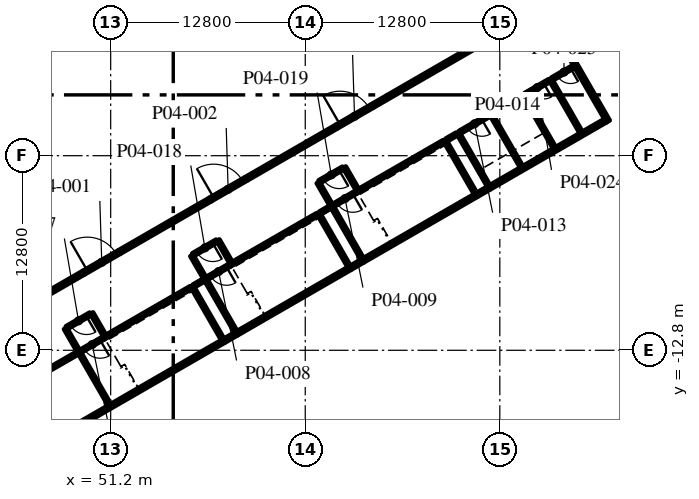
"""IFC4 building model, lengths in metres.
Left out: names, types, materials, properties, quantities, classifications, styles, units other than length and angle.
Written with IfcOpenShell. Run it as: python <this file> out.ifc"""

import sys

from ifc_helpers import new_model, si_unit, direction, frame, frame_2d, origin, place, context, subcontext, project, spatial, rectangle, extrude, element, fill, save


model = new_model("IFC4")
c1 = context("Model", 3, precision=1e-05, world=origin(), true_north=direction((0.0, 1.0)))
c2 = subcontext(c1, "Body", "Model", "MODEL_VIEW")
j1 = project(units=[si_unit("LENGTHUNIT", "METRE"), si_unit("PLANEANGLEUNIT", "RADIAN")], contexts=[c1])
p1 = place(None, origin())
s1 = spatial("IfcSite", under=j1, at=p1, CompositionType="ELEMENT")
p2 = place(p1, origin())
s2 = spatial("IfcBuilding", under=s1, at=p2, CompositionType="ELEMENT")
p3 = place(p2, frame((0.0, 0.0, 21.6)))
s3 = spatial("IfcBuildingStorey", under=s2, at=p3, CompositionType="ELEMENT", Elevation=21.6)
p4 = place(p3, frame((79.603, 9.73, 0.0), z_axis=(0.0, 0.0, 1.0), x_axis=(0.499999331568, -0.866025789703, 0.0)))
e1 = element("IfcWall", 1, at=p4, inside=s3, PredefinedType="SOLIDWALL", context=c2, shape_type="SweptSolid", body=[
    extrude(rectangle(XDim=8.625, YDim=0.25, at=frame_2d((4.312, 0.0))), origin(), (0.0, 0.0, 1.0), 4.5),
])
p5 = place(p3, frame((58.63, -12.194, 0.0), z_axis=(0.0, 0.0, 1.0), x_axis=(-0.866027159341, -0.499996959274, 0.0)))
e2 = element("IfcWall", 2, at=p5, inside=s3, PredefinedType="SOLIDWALL", context=c2, shape_type="SweptSolid", body=[
    extrude(rectangle(XDim=11.625, YDim=0.25, at=frame_2d((5.812, 0.0))), origin(), (0.0, 0.0, 1.0), 4.5),
])
p6 = place(p3, frame((66.944, -7.394, 0.0), z_axis=(0.0, 0.0, 1.0), x_axis=(-0.866033360935, -0.499986217557, 0.0)))
e3 = element("IfcWall", 3, at=p6, inside=s3, PredefinedType="SOLIDWALL", context=c2, shape_type="SweptSolid", body=[
    extrude(rectangle(XDim=8.6, YDim=0.25, at=frame_2d((4.3, 0.0))), origin(), (0.0, 0.0, 1.0), 4.5),
])
p7 = place(p3, frame((75.258, -2.594, 0.0), z_axis=(0.0, 0.0, 1.0), x_axis=(-0.866028165386, -0.499995216735, 0.0)))
e4 = element("IfcWall", 4, at=p7, inside=s3, PredefinedType="SOLIDWALL", context=c2, shape_type="SweptSolid", body=[
    extrude(rectangle(XDim=8.6, YDim=0.25, at=frame_2d((4.3, 0.0))), origin(), (0.0, 0.0, 1.0), 4.5),
])
p8 = place(p3, frame((83.744, 2.306, 0.0), z_axis=(0.0, 0.0, 1.0), x_axis=(-0.866013253925, -0.500021043584, 0.0)))
e5 = element("IfcWall", 5, at=p8, inside=s3, PredefinedType="SOLIDWALL", context=c2, shape_type="SweptSolid", body=[
    extrude(rectangle(XDim=8.8, YDim=0.25, at=frame_2d((4.4, 0.0))), origin(), (0.0, 0.0, 1.0), 4.5),
])
p9 = place(p3, frame((49.443, -7.683, 0.0), z_axis=(0.0, 0.0, 1.0), x_axis=(-0.866025499775, -0.499999833739, 0.0)))
e6 = element("IfcWall", 6, at=p9, inside=s3, PredefinedType="SOLIDWALL", context=c2, shape_type="SweptSolid", body=[
    extrude(rectangle(XDim=12.8, YDim=0.25, at=frame_2d((6.4, 0.0))), origin(), (0.0, 0.0, 1.0), 4.5),
])
p10 = place(p3, frame((49.443, -7.683, 0.0), z_axis=(0.0, 0.0, 1.0), x_axis=(0.866019956843, 0.50000943426, 0.0)))
e7 = element("IfcWall", 7, at=p10, inside=s3, PredefinedType="SOLIDWALL", context=c2, shape_type="SweptSolid", body=[
    extrude(rectangle(XDim=2.7, YDim=0.25, at=frame_2d((1.35, 0.0))), origin(), (0.0, 0.0, 1.0), 4.5),
])
p11 = place(p10, frame((0.25, 0.0, 0.0)))
e8 = element("IfcOpeningElement", 8, at=p11, cuts=e7, PredefinedType="OPENING", context=c2, shape_type="SweptSolid", body=[
    extrude(rectangle(XDim=2.2, YDim=2.1, at=frame_2d((1.1, 1.05))), frame((0.0, 0.135, 0.0), z_axis=(0.0, -1.0, 0.0), x_axis=(1.0, 0.0, 0.0)), (0.0, 0.0, 1.0), 0.27),
])
p12 = place(p3, frame((57.757, -2.883, 0.0), z_axis=(0.0, 0.0, 1.0), x_axis=(-0.866028853923, -0.499994024137, 0.0)))
e9 = element("IfcWall", 9, at=p12, inside=s3, PredefinedType="SOLIDWALL", context=c2, shape_type="SweptSolid", body=[
    extrude(rectangle(XDim=6.9, YDim=0.25, at=frame_2d((3.45, 0.0))), origin(), (0.0, 0.0, 1.0), 4.5),
])
p13 = place(p3, frame((57.757, -2.883, 0.0), z_axis=(0.0, 0.0, 1.0), x_axis=(0.86599734893, 0.500048589285, 0.0)))
e10 = element("IfcWall", 10, at=p13, inside=s3, PredefinedType="SOLIDWALL", context=c2, shape_type="SweptSolid", body=[
    extrude(rectangle(XDim=2.7, YDim=0.25, at=frame_2d((1.35, 0.0))), origin(), (0.0, 0.0, 1.0), 4.5),
])
p14 = place(p13, frame((0.25, 0.0, 0.0)))
e11 = element("IfcOpeningElement", 11, at=p14, cuts=e10, PredefinedType="OPENING", context=c2, shape_type="SweptSolid", body=[
    extrude(rectangle(XDim=2.2, YDim=2.1, at=frame_2d((1.1, 1.05))), frame((0.0, 0.135, 0.0), z_axis=(0.0, -1.0, 0.0), x_axis=(1.0, 0.0, 0.0)), (0.0, 0.0, 1.0), 0.27),
])
p15 = place(p3, frame((66.071, 1.917, 0.0), z_axis=(0.0, 0.0, 1.0), x_axis=(-0.866028853923, -0.499994024137, 0.0)))
e12 = element("IfcWall", 12, at=p15, inside=s3, PredefinedType="SOLIDWALL", context=c2, shape_type="SweptSolid", body=[
    extrude(rectangle(XDim=6.9, YDim=0.25, at=frame_2d((3.45, 0.0))), origin(), (0.0, 0.0, 1.0), 4.5),
])
p16 = place(p3, frame((66.071, 1.917, 0.0), z_axis=(0.0, 0.0, 1.0), x_axis=(0.866019956843, 0.50000943426, 0.0)))
e13 = element("IfcWall", 13, at=p16, inside=s3, PredefinedType="SOLIDWALL", context=c2, shape_type="SweptSolid", body=[
    extrude(rectangle(XDim=2.7, YDim=0.25, at=frame_2d((1.35, 0.0))), origin(), (0.0, 0.0, 1.0), 4.5),
])
p17 = place(p16, frame((0.25, 0.0, 0.0)))
e14 = element("IfcOpeningElement", 14, at=p17, cuts=e13, PredefinedType="OPENING", context=c2, shape_type="SweptSolid", body=[
    extrude(rectangle(XDim=2.2, YDim=2.1, at=frame_2d((1.1, 1.05))), frame((0.0, 0.135, 0.0), z_axis=(0.0, -1.0, 0.0), x_axis=(1.0, 0.0, 0.0)), (0.0, 0.0, 1.0), 0.27),
])
p18 = place(p3, frame((79.494, 9.667, 0.0), z_axis=(0.0, 0.0, 1.0), x_axis=(-0.866025499775, -0.499999833739, 0.0)))
e15 = element("IfcWall", 15, at=p18, inside=s3, PredefinedType="SOLIDWALL", context=c2, shape_type="SweptSolid", body=[
    extrude(rectangle(XDim=12.8, YDim=0.25, at=frame_2d((6.4, 0.0))), origin(), (0.0, 0.0, 1.0), 4.5),
])
for number, where, z_axis, x_axis in (
    (16, (59.496, -11.694, 0.0), (0.0, 0.0, 1.0), (-0.866, -0.5, 0.0)),
    (17, (67.81, -6.894, 0.0), (0.0, 0.0, 1.0), (-0.866, -0.5, 0.0)),
    (18, (76.124, -2.094, 0.0), (0.0, 0.0, 1.0), (-0.866, -0.5, 0.0)),
):
    element("IfcWall", number, at=place(p3, frame(where, z_axis=z_axis, x_axis=x_axis)), inside=s3, PredefinedType="SOLIDWALL", context=c2, shape_type="SweptSolid", body=[
        extrude(rectangle(XDim=1.0, YDim=0.25, at=frame_2d((0.5, 0.0))), origin(), (0.0, 0.0, 1.0), 4.5),
    ])
for number, where, z_axis, x_axis in (
    (19, (51.119, -16.385, 0.0), (0.0, 0.0, 1.0), (-0.5, 0.866, 0.0)),
    (20, (58.567, -12.085, 0.0), (0.0, 0.0, 1.0), (-0.5, 0.866, 0.0)),
    (21, (59.433, -11.585, 0.0), (0.0, 0.0, 1.0), (-0.5, 0.866, 0.0)),
    (22, (66.881, -7.285, 0.0), (0.0, 0.0, 1.0), (-0.5, 0.866, 0.0)),
    (23, (67.747, -6.785, 0.0), (0.0, 0.0, 1.0), (-0.5, 0.866, 0.0)),
    (24, (75.195, -2.486, 0.0), (0.0, 0.0, 1.0), (-0.5, 0.866, 0.0)),
):
    element("IfcWall", number, at=place(p3, frame(where, z_axis=z_axis, x_axis=x_axis)), inside=s3, PredefinedType="SOLIDWALL", context=c2, shape_type="SweptSolid", body=[
        extrude(rectangle(XDim=4.0, YDim=0.2, at=frame_2d((2.0, 0.0))), origin(), (0.0, 0.0, 1.0), 4.5),
    ])
p19 = place(p3, frame((50.722, -11.996, 0.0), z_axis=(0.0, 0.0, 1.0), x_axis=(-0.866036909293, -0.499980071345, 0.0)))
e25 = element("IfcWall", 25, at=p19, inside=s3, PredefinedType="SOLIDWALL", context=c2, shape_type="SweptSolid", body=[
    extrude(rectangle(XDim=1.75, YDim=0.2, at=frame_2d((0.875, 0.0))), origin(), (0.0, 0.0, 1.0), 4.5),
])
p20 = place(p19, frame((0.25, 0.0, 0.0)))
e26 = element("IfcOpeningElement", 26, at=p20, cuts=e25, PredefinedType="OPENING", context=c2, shape_type="SweptSolid", body=[
    extrude(rectangle(XDim=1.2, YDim=2.1, at=frame_2d((0.6, 1.05))), frame((0.0, 0.11, 0.0), z_axis=(0.0, -1.0, 0.0), x_axis=(1.0, 0.0, 0.0)), (0.0, 0.0, 1.0), 0.22),
])
p21 = place(p3, frame((50.722, -11.996, 0.0), z_axis=(0.0, 0.0, 1.0), x_axis=(0.866027239912, 0.49999681972, 0.0)))
e27 = element("IfcWall", 27, at=p21, inside=s3, PredefinedType="SOLIDWALL", context=c2, shape_type="SweptSolid", body=[
    extrude(rectangle(XDim=6.65, YDim=0.2, at=frame_2d((3.325, 0.0))), origin(), (0.0, 0.0, 1.0), 4.5),
])
p22 = place(p3, frame((59.035, -7.196, 0.0), z_axis=(0.0, 0.0, 1.0), x_axis=(-0.866002029911, -0.500040482552, 0.0)))
e28 = element("IfcWall", 28, at=p22, inside=s3, PredefinedType="SOLIDWALL", context=c2, shape_type="SweptSolid", body=[
    extrude(rectangle(XDim=1.75, YDim=0.2, at=frame_2d((0.875, 0.0))), origin(), (0.0, 0.0, 1.0), 4.5),
])
p23 = place(p22, frame((0.25, 0.0, 0.0)))
e29 = element("IfcOpeningElement", 29, at=p23, cuts=e28, PredefinedType="OPENING", context=c2, shape_type="SweptSolid", body=[
    extrude(rectangle(XDim=1.2, YDim=2.1, at=frame_2d((0.6, 1.05))), frame((0.0, 0.11, 0.0), z_axis=(0.0, -1.0, 0.0), x_axis=(1.0, 0.0, 0.0)), (0.0, 0.0, 1.0), 0.22),
])
p24 = place(p3, frame((59.035, -7.196, 0.0), z_axis=(0.0, 0.0, 1.0), x_axis=(0.866027239912, 0.49999681972, 0.0)))
e30 = element("IfcWall", 30, at=p24, inside=s3, PredefinedType="SOLIDWALL", context=c2, shape_type="SweptSolid", body=[
    extrude(rectangle(XDim=6.65, YDim=0.2, at=frame_2d((3.325, 0.0))), origin(), (0.0, 0.0, 1.0), 4.5),
])
p25 = place(p3, frame((67.349, -2.396, 0.0), z_axis=(0.0, 0.0, 1.0), x_axis=(-0.866036909293, -0.499980071345, 0.0)))
e31 = element("IfcWall", 31, at=p25, inside=s3, PredefinedType="SOLIDWALL", context=c2, shape_type="SweptSolid", body=[
    extrude(rectangle(XDim=1.75, YDim=0.2, at=frame_2d((0.875, 0.0))), origin(), (0.0, 0.0, 1.0), 4.5),
])
p26 = place(p25, frame((0.25, 0.0, 0.0)))
e32 = element("IfcOpeningElement", 32, at=p26, cuts=e31, PredefinedType="OPENING", context=c2, shape_type="SweptSolid", body=[
    extrude(rectangle(XDim=1.2, YDim=2.1, at=frame_2d((0.6, 1.05))), frame((0.0, 0.11, 0.0), z_axis=(0.0, -1.0, 0.0), x_axis=(1.0, 0.0, 0.0)), (0.0, 0.0, 1.0), 0.22),
])
p27 = place(p3, frame((67.349, -2.396, 0.0), z_axis=(0.0, 0.0, 1.0), x_axis=(0.86601134256, 0.500024353964, 0.0)))
e33 = element("IfcWall", 33, at=p27, inside=s3, PredefinedType="SOLIDWALL", context=c2, shape_type="SweptSolid", body=[
    extrude(rectangle(XDim=6.65, YDim=0.2, at=frame_2d((3.325, 0.0))), origin(), (0.0, 0.0, 1.0), 4.5),
])
for number, where, z_axis, x_axis in (
    (34, (76.061, -1.986, 0.0), (0.0, 0.0, 1.0), (-0.5, 0.866, 0.0)),
    (35, (78.226, -0.736, 0.0), (0.0, 0.0, 1.0), (-0.5, 0.866, 0.0)),
    (36, (80.391, 0.514, 0.0), (0.0, 0.0, 1.0), (-0.5, 0.866, 0.0)),
):
    element("IfcWall", number, at=place(p3, frame(where, z_axis=z_axis, x_axis=x_axis)), inside=s3, PredefinedType="SOLIDWALL", context=c2, shape_type="SweptSolid", body=[
        extrude(rectangle(XDim=4.0, YDim=0.2, at=frame_2d((2.0, 0.0))), origin(), (0.0, 0.0, 1.0), 4.5),
    ])
p28 = place(p3, frame((76.139, 2.679, 0.0), z_axis=(0.0, 0.0, 1.0), x_axis=(-0.865980515519, -0.500077740698, 0.0)))
e37 = element("IfcWall", 37, at=p28, inside=s3, PredefinedType="SOLIDWALL", context=c2, shape_type="SweptSolid", body=[
    extrude(rectangle(XDim=2.3, YDim=0.2, at=frame_2d((1.15, 0.0))), origin(), (0.0, 0.0, 1.0), 4.5),
])
p29 = place(p28, frame((0.6, 0.0, 0.0)))
e38 = element("IfcOpeningElement", 38, at=p29, cuts=e37, PredefinedType="OPENING", context=c2, shape_type="SweptSolid", body=[
    extrude(rectangle(XDim=1.1, YDim=2.1, at=frame_2d((0.55, 1.05))), frame((0.0, 0.11, 0.0), z_axis=(0.0, -1.0, 0.0), x_axis=(1.0, 0.0, 0.0)), (0.0, 0.0, 1.0), 0.22),
])
p30 = place(p3, frame((78.304, 3.929, 0.0), z_axis=(0.0, 0.0, 1.0), x_axis=(-0.865980515519, -0.500077740698, 0.0)))
e39 = element("IfcWall", 39, at=p30, inside=s3, PredefinedType="SOLIDWALL", context=c2, shape_type="SweptSolid", body=[
    extrude(rectangle(XDim=2.3, YDim=0.2, at=frame_2d((1.15, 0.0))), origin(), (0.0, 0.0, 1.0), 4.5),
])
p31 = place(p30, frame((0.6, 0.0, 0.0)))
e40 = element("IfcOpeningElement", 40, at=p31, cuts=e39, PredefinedType="OPENING", context=c2, shape_type="SweptSolid", body=[
    extrude(rectangle(XDim=1.1, YDim=2.1, at=frame_2d((0.55, 1.05))), frame((0.0, 0.11, 0.0), z_axis=(0.0, -1.0, 0.0), x_axis=(1.0, 0.0, 0.0)), (0.0, 0.0, 1.0), 0.22),
])
for number, where, z_axis, x_axis in (
    (41, (49.07, -12.835, 0.0), (0.0, 0.0, 1.0), (-0.5, 0.866, 0.0)),
    (42, (50.802, -11.835, 0.0), (0.0, 0.0, 1.0), (-0.5, 0.866, 0.0)),
):
    element("IfcWall", number, at=place(p3, frame(where, z_axis=z_axis, x_axis=x_axis)), inside=s3, PredefinedType="PARTITIONING", context=c2, shape_type="SweptSolid", body=[
        extrude(rectangle(XDim=1.7, YDim=0.2, at=frame_2d((0.85, 0.0))), origin(), (0.0, 0.0, 1.0), 4.5),
    ])
for number, where, z_axis, x_axis in (
    (43, (57.383, -8.035, 0.0), (0.0, 0.0, 1.0), (-0.5, 0.866, 0.0)),
    (44, (59.115, -7.035, 0.0), (0.0, 0.0, 1.0), (-0.5, 0.866, 0.0)),
):
    element("IfcWall", number, at=place(p3, frame(where, z_axis=z_axis, x_axis=x_axis)), inside=s3, PredefinedType="PARTITIONING", context=c2, shape_type="SweptSolid", body=[
        extrude(rectangle(XDim=1.7, YDim=0.2, at=frame_2d((0.85, 0.0))), origin(), (0.0, 0.0, 1.0), 4.5),
    ])
p32 = place(p3, frame((65.697, -3.235, 0.0), z_axis=(0.0, 0.0, 1.0), x_axis=(-0.499892348375, 0.866087547558, 0.0)))
e45 = element("IfcWall", 45, at=p32, inside=s3, PredefinedType="PARTITIONING", context=c2, shape_type="SweptSolid", body=[
    extrude(rectangle(XDim=1.7, YDim=0.2, at=frame_2d((0.85, 0.0))), origin(), (0.0, 0.0, 1.0), 4.5),
])
p33 = place(p3, frame((67.429, -2.235, 0.0), z_axis=(0.0, 0.0, 1.0), x_axis=(-0.500000056704, 0.866025371046, 0.0)))
e46 = element("IfcWall", 46, at=p33, inside=s3, PredefinedType="PARTITIONING", context=c2, shape_type="SweptSolid", body=[
    extrude(rectangle(XDim=1.7, YDim=0.2, at=frame_2d((0.85, 0.0))), origin(), (0.0, 0.0, 1.0), 4.5),
])
p34 = place(p3, frame((49.865, -10.413, 0.0), z_axis=(0.0, 0.0, 1.0), x_axis=(-0.866047807691, -0.499961193289, 0.0)))
e47 = element("IfcWall", 47, at=p34, inside=s3, PredefinedType="PARTITIONING", context=c2, shape_type="SweptSolid", body=[
    extrude(rectangle(XDim=1.8, YDim=0.2, at=frame_2d((0.9, 0.0))), origin(), (0.0, 0.0, 1.0), 4.5),
])
p35 = place(p34, frame((0.3, 0.0, 0.0)))
e48 = element("IfcOpeningElement", 48, at=p35, cuts=e47, PredefinedType="OPENING", context=c2, shape_type="SweptSolid", body=[
    extrude(rectangle(XDim=1.2, YDim=2.1, at=frame_2d((0.6, 1.05))), frame((0.0, 0.11, 0.0), z_axis=(0.0, -1.0, 0.0), x_axis=(1.0, 0.0, 0.0)), (0.0, 0.0, 1.0), 0.22),
])
p36 = place(p3, frame((58.179, -5.613, 0.0), z_axis=(0.0, 0.0, 1.0), x_axis=(-0.866047807691, -0.499961193289, 0.0)))
e49 = element("IfcWall", 49, at=p36, inside=s3, PredefinedType="PARTITIONING", context=c2, shape_type="SweptSolid", body=[
    extrude(rectangle(XDim=1.8, YDim=0.2, at=frame_2d((0.9, 0.0))), origin(), (0.0, 0.0, 1.0), 4.5),
])
p37 = place(p36, frame((0.3, 0.0, 0.0)))
e50 = element("IfcOpeningElement", 50, at=p37, cuts=e49, PredefinedType="OPENING", context=c2, shape_type="SweptSolid", body=[
    extrude(rectangle(XDim=1.2, YDim=2.1, at=frame_2d((0.6, 1.05))), frame((0.0, 0.11, 0.0), z_axis=(0.0, -1.0, 0.0), x_axis=(1.0, 0.0, 0.0)), (0.0, 0.0, 1.0), 0.22),
])
p38 = place(p3, frame((66.493, -0.812, 0.0), z_axis=(0.0, 0.0, 1.0), x_axis=(-0.866081705922, -0.499902469156, 0.0)))
e51 = element("IfcWall", 51, at=p38, inside=s3, PredefinedType="PARTITIONING", context=c2, shape_type="SweptSolid", body=[
    extrude(rectangle(XDim=1.8, YDim=0.2, at=frame_2d((0.9, 0.0))), origin(), (0.0, 0.0, 1.0), 4.5),
])
p39 = place(p38, frame((0.3, 0.0, 0.0)))
e52 = element("IfcOpeningElement", 52, at=p39, cuts=e51, PredefinedType="OPENING", context=c2, shape_type="SweptSolid", body=[
    extrude(rectangle(XDim=1.2, YDim=2.1, at=frame_2d((0.6, 1.05))), frame((0.0, 0.11, 0.0), z_axis=(0.0, -1.0, 0.0), x_axis=(1.0, 0.0, 0.0)), (0.0, 0.0, 1.0), 0.22),
])
p40 = place(p3, frame((82.145, 1.527, 0.0), z_axis=(0.0, 0.0, 1.0), x_axis=(-0.49999894854, 0.866026010844, 0.0)))
e53 = element("IfcWall", 53, at=p40, inside=s3, PredefinedType="PARTITIONING", context=c2, shape_type="SweptSolid", body=[
    extrude(rectangle(XDim=4.0, YDim=0.2, at=frame_2d((2.0, 0.0))), origin(), (0.0, 0.0, 1.0), 4.5),
])
p41 = place(p3, frame((80.058, 4.941, 0.0), z_axis=(0.0, 0.0, 1.0), x_axis=(-0.865978377894, -0.500081442387, 0.0)))
e54 = element("IfcWall", 54, at=p41, inside=s3, PredefinedType="PARTITIONING", context=c2, shape_type="SweptSolid", body=[
    extrude(rectangle(XDim=1.825, YDim=0.2, at=frame_2d((0.913, 0.0))), origin(), (0.0, 0.0, 1.0), 4.5),
])
p42 = place(p41, frame((0.413, 0.0, 0.0)))
e55 = element("IfcOpeningElement", 55, at=p42, cuts=e54, PredefinedType="OPENING", context=c2, shape_type="SweptSolid", body=[
    extrude(rectangle(XDim=1.0, YDim=2.1, at=frame_2d((0.5, 1.05))), frame((0.0, 0.11, 0.0), z_axis=(0.0, -1.0, 0.0), x_axis=(1.0, 0.0, 0.0)), (0.0, 0.0, 1.0), 0.22),
])
p43 = place(p3, frame((81.682, 5.879, 0.0), z_axis=(0.0, 0.0, 1.0), x_axis=(-0.865964676353, -0.500105168249, 0.0)))
e56 = element("IfcWall", 56, at=p43, inside=s3, PredefinedType="PARTITIONING", context=c2, shape_type="SweptSolid", body=[
    extrude(rectangle(XDim=1.675, YDim=0.2, at=frame_2d((0.837, 0.0))), origin(), (0.0, 0.0, 1.0), 4.5),
])
p44 = place(p43, frame((0.262, 0.0, 0.0)))
e57 = element("IfcOpeningElement", 57, at=p44, cuts=e56, PredefinedType="OPENING", context=c2, shape_type="SweptSolid", body=[
    extrude(rectangle(XDim=1.0, YDim=2.1, at=frame_2d((0.5, 1.05))), frame((0.0, 0.11, 0.0), z_axis=(0.0, -1.0, 0.0), x_axis=(1.0, 0.0, 0.0)), (0.0, 0.0, 1.0), 0.22),
])
p45 = place(p3, frame((46.5, -14.434, 0.0), z_axis=(0.0, 0.0, 1.0), x_axis=(0.866046596414, 0.499963291492, 0.0)))
e58 = element("IfcWall", 58, at=p45, inside=s3, PredefinedType="PARTITIONING", context=c2, shape_type="SweptSolid", body=[
    extrude(rectangle(XDim=2.925, YDim=0.2, at=frame_2d((1.462, 0.0))), origin(), (0.0, 0.0, 1.0), 4.5),
])
p46 = place(p3, frame((56.654, -8.571, 0.0), z_axis=(0.0, 0.0, 1.0), x_axis=(0.866094119867, 0.499880961361, 0.0)))
e59 = element("IfcWall", 59, at=p46, inside=s3, PredefinedType="PARTITIONING", context=c2, shape_type="SweptSolid", body=[
    extrude(rectangle(XDim=0.8, YDim=0.2, at=frame_2d((0.4, 0.0))), origin(), (0.0, 0.0, 1.0), 4.5),
])
p47 = place(p3, frame((64.968, -3.771, 0.0), z_axis=(0.0, 0.0, 1.0), x_axis=(0.865885638426, 0.500242002602, 0.0)))
e60 = element("IfcWall", 60, at=p47, inside=s3, PredefinedType="PARTITIONING", context=c2, shape_type="SweptSolid", body=[
    extrude(rectangle(XDim=0.8, YDim=0.2, at=frame_2d((0.4, 0.0))), origin(), (0.0, 0.0, 1.0), 4.5),
])
p48 = place(p3, frame((73.281, 1.029, 0.0), z_axis=(0.0, 0.0, 1.0), x_axis=(0.865961984968, 0.500109828528, 0.0)))
e61 = element("IfcWall", 61, at=p48, inside=s3, PredefinedType="PARTITIONING", context=c2, shape_type="SweptSolid", body=[
    extrude(rectangle(XDim=0.8, YDim=0.2, at=frame_2d((0.4, 0.0))), origin(), (0.0, 0.0, 1.0), 4.5),
])
p49 = place(p11, origin())
e62 = element("IfcDoor", 62, at=p49, inside=s3, OperationType="DOUBLE_DOOR_SINGLE_SWING", PredefinedType="DOOR", context=c2, shape_type="SweptSolid", body=[
    extrude(rectangle(XDim=2.2, YDim=2.1, at=frame_2d((1.1, 1.05))), frame((0.0, 0.025, 0.0), z_axis=(0.0, -1.0, 0.0), x_axis=(1.0, 0.0, 0.0)), (0.0, 0.0, 1.0), 0.05),
])
fill(e8, e62)
p50 = place(p14, origin())
e63 = element("IfcDoor", 63, at=p50, inside=s3, OperationType="DOUBLE_DOOR_SINGLE_SWING", PredefinedType="DOOR", context=c2, shape_type="SweptSolid", body=[
    extrude(rectangle(XDim=2.2, YDim=2.1, at=frame_2d((1.1, 1.05))), frame((0.0, 0.025, 0.0), z_axis=(0.0, -1.0, 0.0), x_axis=(1.0, 0.0, 0.0)), (0.0, 0.0, 1.0), 0.05),
])
fill(e11, e63)
p51 = place(p17, origin())
e64 = element("IfcDoor", 64, at=p51, inside=s3, OperationType="DOUBLE_DOOR_SINGLE_SWING", PredefinedType="DOOR", context=c2, shape_type="SweptSolid", body=[
    extrude(rectangle(XDim=2.2, YDim=2.1, at=frame_2d((1.1, 1.05))), frame((0.0, 0.025, 0.0), z_axis=(0.0, -1.0, 0.0), x_axis=(1.0, 0.0, 0.0)), (0.0, 0.0, 1.0), 0.05),
])
fill(e14, e64)
p52 = place(p20, origin())
e65 = element("IfcDoor", 65, at=p52, inside=s3, OperationType="SINGLE_SWING_LEFT", PredefinedType="DOOR", context=c2, shape_type="SweptSolid", body=[
    extrude(rectangle(XDim=1.2, YDim=2.1, at=frame_2d((0.6, 1.05))), frame((0.0, 0.025, 0.0), z_axis=(0.0, -1.0, 0.0), x_axis=(1.0, 0.0, 0.0)), (0.0, 0.0, 1.0), 0.05),
])
fill(e26, e65)
p53 = place(p23, origin())
e66 = element("IfcDoor", 66, at=p53, inside=s3, OperationType="SINGLE_SWING_LEFT", PredefinedType="DOOR", context=c2, shape_type="SweptSolid", body=[
    extrude(rectangle(XDim=1.2, YDim=2.1, at=frame_2d((0.6, 1.05))), frame((0.0, 0.025, 0.0), z_axis=(0.0, -1.0, 0.0), x_axis=(1.0, 0.0, 0.0)), (0.0, 0.0, 1.0), 0.05),
])
fill(e29, e66)
p54 = place(p26, origin())
e67 = element("IfcDoor", 67, at=p54, inside=s3, OperationType="SINGLE_SWING_LEFT", PredefinedType="DOOR", context=c2, shape_type="SweptSolid", body=[
    extrude(rectangle(XDim=1.2, YDim=2.1, at=frame_2d((0.6, 1.05))), frame((0.0, 0.025, 0.0), z_axis=(0.0, -1.0, 0.0), x_axis=(1.0, 0.0, 0.0)), (0.0, 0.0, 1.0), 0.05),
])
fill(e32, e67)
p55 = place(p29, origin())
e68 = element("IfcDoor", 68, at=p55, inside=s3, OperationType="DOUBLE_DOOR_SLIDING", PredefinedType="DOOR", context=c2, shape_type="SweptSolid", body=[
    extrude(rectangle(XDim=1.1, YDim=2.1, at=frame_2d((0.55, 1.05))), frame((0.0, 0.025, 0.0), z_axis=(0.0, -1.0, 0.0), x_axis=(1.0, 0.0, 0.0)), (0.0, 0.0, 1.0), 0.05),
])
fill(e38, e68)
p56 = place(p31, origin())
e69 = element("IfcDoor", 69, at=p56, inside=s3, OperationType="DOUBLE_DOOR_SLIDING", PredefinedType="DOOR", context=c2, shape_type="SweptSolid", body=[
    extrude(rectangle(XDim=1.1, YDim=2.1, at=frame_2d((0.55, 1.05))), frame((0.0, 0.025, 0.0), z_axis=(0.0, -1.0, 0.0), x_axis=(1.0, 0.0, 0.0)), (0.0, 0.0, 1.0), 0.05),
])
fill(e40, e69)
p57 = place(p35, origin())
e70 = element("IfcDoor", 70, at=p57, inside=s3, OperationType="SINGLE_SWING_LEFT", PredefinedType="DOOR", context=c2, shape_type="SweptSolid", body=[
    extrude(rectangle(XDim=1.2, YDim=2.1, at=frame_2d((0.6, 1.05))), frame((0.0, 0.025, 0.0), z_axis=(0.0, -1.0, 0.0), x_axis=(1.0, 0.0, 0.0)), (0.0, 0.0, 1.0), 0.05),
])
fill(e48, e70)
p58 = place(p37, origin())
e71 = element("IfcDoor", 71, at=p58, inside=s3, OperationType="SINGLE_SWING_LEFT", PredefinedType="DOOR", context=c2, shape_type="SweptSolid", body=[
    extrude(rectangle(XDim=1.2, YDim=2.1, at=frame_2d((0.6, 1.05))), frame((0.0, 0.025, 0.0), z_axis=(0.0, -1.0, 0.0), x_axis=(1.0, 0.0, 0.0)), (0.0, 0.0, 1.0), 0.05),
])
fill(e50, e71)
p59 = place(p39, origin())
e72 = element("IfcDoor", 72, at=p59, inside=s3, OperationType="SINGLE_SWING_LEFT", PredefinedType="DOOR", context=c2, shape_type="SweptSolid", body=[
    extrude(rectangle(XDim=1.2, YDim=2.1, at=frame_2d((0.6, 1.05))), frame((0.0, 0.025, 0.0), z_axis=(0.0, -1.0, 0.0), x_axis=(1.0, 0.0, 0.0)), (0.0, 0.0, 1.0), 0.05),
])
fill(e52, e72)
p60 = place(p42, origin())
e73 = element("IfcDoor", 73, at=p60, inside=s3, OperationType="SINGLE_SWING_LEFT", PredefinedType="DOOR", context=c2, shape_type="SweptSolid", body=[
    extrude(rectangle(XDim=1.0, YDim=2.1, at=frame_2d((0.5, 1.05))), frame((0.0, 0.025, 0.0), z_axis=(0.0, -1.0, 0.0), x_axis=(1.0, 0.0, 0.0)), (0.0, 0.0, 1.0), 0.05),
])
fill(e55, e73)
p61 = place(p44, origin())
e74 = element("IfcDoor", 74, at=p61, inside=s3, OperationType="SINGLE_SWING_LEFT", PredefinedType="DOOR", context=c2, shape_type="SweptSolid", body=[
    extrude(rectangle(XDim=1.0, YDim=2.1, at=frame_2d((0.5, 1.05))), frame((0.0, 0.025, 0.0), z_axis=(0.0, -1.0, 0.0), x_axis=(1.0, 0.0, 0.0)), (0.0, 0.0, 1.0), 0.05),
])
fill(e57, e74)
save(model, sys.argv[1])
